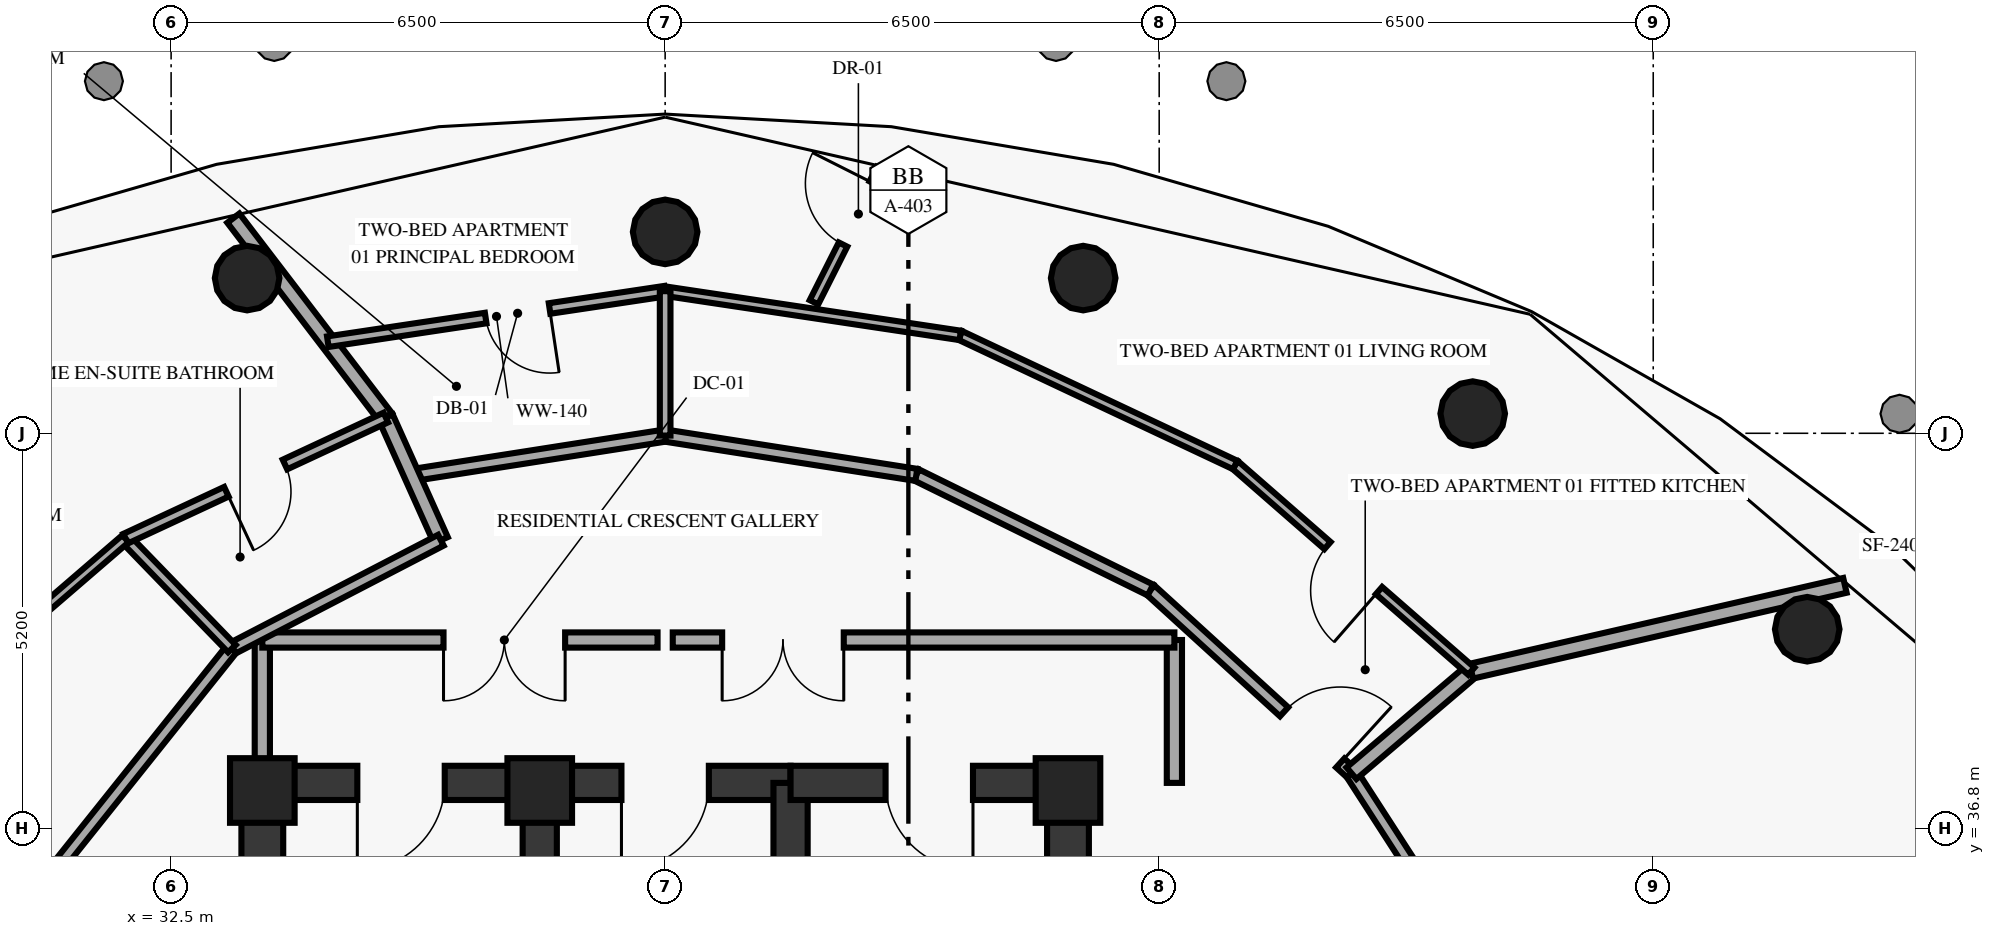
"""IFC4 building model, lengths in metres.
Left out: names, types, materials, properties, quantities, classifications, styles, units other than length and angle.
Written with IfcOpenShell. Run it as: python <this file> out.ifc"""

import sys

from ifc_helpers import new_model, si_unit, direction, frame, frame_2d, origin, origin_2d, place, context, subcontext, project, spatial, rectangle, circle, extrude, element, fill, save


model = new_model("IFC4")
c1 = context("Model", 3, precision=1e-05, world=origin(), true_north=direction((0.0, 1.0)))
c2 = subcontext(c1, "Body", "Model", "MODEL_VIEW")
j1 = project(units=[si_unit("LENGTHUNIT", "METRE"), si_unit("PLANEANGLEUNIT", "RADIAN")], contexts=[c1])
p1 = place(None, origin())
s1 = spatial("IfcSite", under=j1, at=p1, CompositionType="ELEMENT")
p2 = place(p1, origin())
s2 = spatial("IfcBuilding", under=s1, at=p2, CompositionType="ELEMENT")
p3 = place(p2, frame((0.0, 0.0, 208.15)))
s3 = spatial("IfcBuildingStorey", under=s2, at=p3, CompositionType="ELEMENT", Elevation=208.15)
for number, where, z_axis, x_axis in (
    (1, (44.3, 37.3, 0.0), (0.0, 0.0, 1.0), (1.0, 0.0, 0.0)),
    (2, (37.35, 37.3, 0.0), (0.0, 0.0, 1.0), (1.0, 0.0, 0.0)),
    (3, (33.7, 37.3, 0.0), (0.0, 0.0, 1.0), (1.0, 0.0, 0.0)),
):
    element("IfcColumn", number, at=place(p3, frame(where, z_axis=z_axis, x_axis=x_axis)), inside=s3, PredefinedType="PILASTER", context=c2, shape_type="SweptSolid", body=[
        extrude(rectangle(XDim=0.85, YDim=0.85, at=origin_2d()), origin(), (0.0, 0.0, 1.0), 3.41),
    ])
for number, where, z_axis, x_axis in (
    (4, (54.026, 39.422, 0.0), (0.0, 0.0, 1.0), (1.0, 0.0, 0.0)),
    (5, (49.625, 42.259, 0.0), (0.0, 0.0, 1.0), (1.0, 0.0, 0.0)),
    (6, (44.5, 44.042, 0.0), (0.0, 0.0, 1.0), (1.0, 0.0, 0.0)),
    (7, (39.0, 44.65, 0.0), (0.0, 0.0, 1.0), (1.0, 0.0, 0.0)),
    (8, (33.5, 44.042, 0.0), (0.0, 0.0, 1.0), (1.0, 0.0, 0.0)),
):
    element("IfcColumn", number, at=place(p3, frame(where, z_axis=z_axis, x_axis=x_axis)), inside=s3, PredefinedType="COLUMN", context=c2, shape_type="SweptSolid", body=[
        extrude(circle(Radius=0.425, at=origin_2d()), origin(), (0.0, 0.0, 1.0), 3.41),
    ])
for number, where, z_axis, x_axis in (
    (9, (33.7, 29.05, 0.0), (0.0, 0.0, 1.0), (0.0, 1.0, 0.0)),
    (10, (44.3, 29.05, 0.0), (0.0, 0.0, 1.0), (0.0, 1.0, 0.0)),
):
    element("IfcWall", number, at=place(p3, frame(where, z_axis=z_axis, x_axis=x_axis)), inside=s3, PredefinedType="SHEAR", context=c2, shape_type="SweptSolid", body=[
        extrude(rectangle(XDim=8.35, YDim=0.55, at=frame_2d((4.175, 0.0))), origin(), (0.0, 0.0, 1.0), 3.41),
    ])
p4 = place(p3, frame((37.35, 37.4, 0.0), z_axis=(0.0, 0.0, 1.0), x_axis=(-1.0, 0.0, 0.0)))
e11 = element("IfcWall", 11, at=p4, inside=s3, PredefinedType="SHEAR", context=c2, shape_type="SweptSolid", body=[
    extrude(rectangle(XDim=3.65, YDim=0.45, at=frame_2d((1.825, 0.0))), origin(), (0.0, 0.0, 1.0), 3.41),
])
p5 = place(p4, frame((1.25, 0.0, 0.0)))
e12 = element("IfcOpeningElement", 12, at=p5, cuts=e11, PredefinedType="OPENING", context=c2, shape_type="SweptSolid", body=[
    extrude(rectangle(XDim=1.15, YDim=2.15, at=frame_2d((0.575, 1.075))), frame((0.0, 0.235, 0.0), z_axis=(0.0, -1.0, 0.0), x_axis=(1.0, 0.0, 0.0)), (0.0, 0.0, 1.0), 0.47),
])
p6 = place(p3, frame((37.35, 29.05, 0.0), z_axis=(0.0, 0.0, 1.0), x_axis=(0.0, 1.0, 0.0)))
e13 = element("IfcWall", 13, at=p6, inside=s3, PredefinedType="SHEAR", context=c2, shape_type="SweptSolid", body=[
    extrude(rectangle(XDim=8.35, YDim=0.45, at=frame_2d((4.175, 0.0))), origin(), (0.0, 0.0, 1.0), 3.41),
])
p7 = place(p3, frame((40.65, 37.4, 0.0), z_axis=(0.0, 0.0, 1.0), x_axis=(-1.0, 0.0, 0.0)))
e14 = element("IfcWall", 14, at=p7, inside=s3, PredefinedType="SHEAR", context=c2, shape_type="SweptSolid", body=[
    extrude(rectangle(XDim=3.3, YDim=0.45, at=frame_2d((1.65, 0.0))), origin(), (0.0, 0.0, 1.0), 3.41),
])
p8 = place(p7, frame((1.075, 0.0, 0.0)))
e15 = element("IfcOpeningElement", 15, at=p8, cuts=e14, PredefinedType="OPENING", context=c2, shape_type="SweptSolid", body=[
    extrude(rectangle(XDim=1.15, YDim=2.15, at=frame_2d((0.575, 1.075))), frame((0.0, 0.235, 0.0), z_axis=(0.0, -1.0, 0.0), x_axis=(1.0, 0.0, 0.0)), (0.0, 0.0, 1.0), 0.47),
])
p9 = place(p3, frame((40.65, 29.05, 0.0), z_axis=(0.0, 0.0, 1.0), x_axis=(0.0, 1.0, 0.0)))
e16 = element("IfcWall", 16, at=p9, inside=s3, PredefinedType="SHEAR", context=c2, shape_type="SweptSolid", body=[
    extrude(rectangle(XDim=8.35, YDim=0.45, at=frame_2d((4.175, 0.0))), origin(), (0.0, 0.0, 1.0), 3.41),
])
p10 = place(p3, frame((44.3, 37.4, 0.0), z_axis=(0.0, 0.0, 1.0), x_axis=(-1.0, 0.0, 0.0)))
e17 = element("IfcWall", 17, at=p10, inside=s3, PredefinedType="SHEAR", context=c2, shape_type="SweptSolid", body=[
    extrude(rectangle(XDim=3.65, YDim=0.45, at=frame_2d((1.825, 0.0))), origin(), (0.0, 0.0, 1.0), 3.41),
])
p11 = place(p10, frame((1.25, 0.0, 0.0)))
e18 = element("IfcOpeningElement", 18, at=p11, cuts=e17, PredefinedType="OPENING", context=c2, shape_type="SweptSolid", body=[
    extrude(rectangle(XDim=1.15, YDim=2.15, at=frame_2d((0.575, 1.075))), frame((0.0, 0.235, 0.0), z_axis=(0.0, -1.0, 0.0), x_axis=(1.0, 0.0, 0.0)), (0.0, 0.0, 1.0), 0.47),
])
for number, where, z_axis, x_axis in (
    (19, (33.7, 37.4, 0.0), (0.0, 0.0, 1.0), (0.0, 1.0, 0.0)),
    (20, (45.7, 37.4, 0.0), (0.0, 0.0, 1.0), (0.0, 1.0, 0.0)),
):
    element("IfcWall", number, at=place(p3, frame(where, z_axis=z_axis, x_axis=x_axis)), inside=s3, PredefinedType="SOLIDWALL", context=c2, shape_type="SweptSolid", body=[
        extrude(rectangle(XDim=1.88, YDim=0.2, at=frame_2d((0.94, 0.0))), origin(), (0.0, 0.0, 1.0), 3.41),
    ])
p12 = place(p3, frame((38.9, 39.28, 0.0), z_axis=(0.0, 0.0, 1.0), x_axis=(-1.0, 0.0, 0.0)))
e21 = element("IfcWall", 21, at=p12, inside=s3, PredefinedType="SOLIDWALL", context=c2, shape_type="SweptSolid", body=[
    extrude(rectangle(XDim=5.2, YDim=0.2, at=frame_2d((2.6, 0.0))), origin(), (0.0, 0.0, 1.0), 3.41),
])
p13 = place(p12, frame((1.216, 0.0, 0.0)))
e22 = element("IfcOpeningElement", 22, at=p13, cuts=e21, PredefinedType="OPENING", context=c2, shape_type="SweptSolid", body=[
    extrude(rectangle(XDim=1.6, YDim=2.2, at=frame_2d((0.8, 1.1))), frame((0.0, 0.11, 0.0), z_axis=(0.0, -1.0, 0.0), x_axis=(1.0, 0.0, 0.0)), (0.0, 0.0, 1.0), 0.22),
])
p14 = place(p3, frame((45.7, 39.28, 0.0), z_axis=(0.0, 0.0, 1.0), x_axis=(-1.0, 0.0, 0.0)))
e23 = element("IfcWall", 23, at=p14, inside=s3, PredefinedType="SOLIDWALL", context=c2, shape_type="SweptSolid", body=[
    extrude(rectangle(XDim=6.6, YDim=0.2, at=frame_2d((3.3, 0.0))), origin(), (0.0, 0.0, 1.0), 3.41),
])
p15 = place(p14, frame((4.35, 0.0, 0.0)))
e24 = element("IfcOpeningElement", 24, at=p15, cuts=e23, PredefinedType="OPENING", context=c2, shape_type="SweptSolid", body=[
    extrude(rectangle(XDim=1.6, YDim=2.2, at=frame_2d((0.8, 1.1))), frame((0.0, 0.11, 0.0), z_axis=(0.0, -1.0, 0.0), x_axis=(1.0, 0.0, 0.0)), (0.0, 0.0, 1.0), 0.22),
])
p16 = place(p3, frame((50.059, 34.385, 0.0), z_axis=(0.0, 0.0, 1.0), x_axis=(-0.542485127432, 0.840065406094, 0.0)))
e25 = element("IfcWall", 25, at=p16, inside=s3, PredefinedType="PARTITIONING", context=c2, shape_type="SweptSolid", body=[
    extrude(rectangle(XDim=3.74, YDim=0.16, at=frame_2d((1.87, 0.0))), origin(), (0.0, 0.0, 1.0), 3.41),
])
p17 = place(p3, frame((45.385, 39.938, 0.0), z_axis=(0.0, 0.0, 1.0), x_axis=(0.739059723008, -0.673639908132, 0.0)))
e26 = element("IfcWall", 26, at=p17, inside=s3, PredefinedType="PARTITIONING", context=c2, shape_type="SweptSolid", body=[
    extrude(rectangle(XDim=3.579, YDim=0.16, at=frame_2d((1.79, 0.0))), origin(), (0.0, 0.0, 1.0), 3.41),
])
p18 = place(p17, frame((2.379, 0.0, 0.0)))
e27 = element("IfcOpeningElement", 27, at=p18, cuts=e26, PredefinedType="OPENING", context=c2, shape_type="SweptSolid", body=[
    extrude(rectangle(XDim=1.0, YDim=2.15, at=frame_2d((0.5, 1.075))), frame((0.0, 0.09, 0.0), z_axis=(0.0, -1.0, 0.0), x_axis=(1.0, 0.0, 0.0)), (0.0, 0.0, 1.0), 0.18),
])
p19 = place(p3, frame((45.385, 39.938, 0.0), z_axis=(0.0, 0.0, 1.0), x_axis=(-0.897338421719, 0.441343128311, 0.0)))
e28 = element("IfcWall", 28, at=p19, inside=s3, PredefinedType="PARTITIONING", context=c2, shape_type="SweptSolid", body=[
    extrude(rectangle(XDim=3.432, YDim=0.16, at=frame_2d((1.716, 0.0))), origin(), (0.0, 0.0, 1.0), 3.41),
])
p20 = place(p3, frame((42.305, 41.453, 0.0), z_axis=(0.0, 0.0, 1.0), x_axis=(-0.987980356559, 0.154579478111, 0.0)))
e29 = element("IfcWall", 29, at=p20, inside=s3, PredefinedType="PARTITIONING", context=c2, shape_type="SweptSolid", body=[
    extrude(rectangle(XDim=3.345, YDim=0.16, at=frame_2d((1.673, 0.0))), origin(), (0.0, 0.0, 1.0), 3.41),
])
p21 = place(p3, frame((39.0, 41.97, 0.0), z_axis=(0.0, 0.0, 1.0), x_axis=(-0.987972011059, -0.154632808173, 0.0)))
e30 = element("IfcWall", 30, at=p21, inside=s3, PredefinedType="PARTITIONING", context=c2, shape_type="SweptSolid", body=[
    extrude(rectangle(XDim=3.375, YDim=0.16, at=frame_2d((1.688, 0.0))), origin(), (0.0, 0.0, 1.0), 3.41),
])
p22 = place(p3, frame((36.049, 40.593, 0.0), z_axis=(0.0, 0.0, 1.0), x_axis=(-0.409337233456, 0.912383159263, 0.0)))
e31 = element("IfcWall", 31, at=p22, inside=s3, PredefinedType="PARTITIONING", context=c2, shape_type="SweptSolid", body=[
    extrude(rectangle(XDim=1.769, YDim=0.2, at=frame_2d((0.885, 0.0))), origin(), (0.0, 0.0, 1.0), 3.41),
])
p23 = place(p3, frame((35.325, 42.207, 0.0), z_axis=(0.0, 0.0, 1.0), x_axis=(-0.607307427022, 0.794466921328, 0.0)))
e32 = element("IfcWall", 32, at=p23, inside=s3, PredefinedType="PARTITIONING", context=c2, shape_type="SweptSolid", body=[
    extrude(rectangle(XDim=3.303, YDim=0.2, at=frame_2d((1.651, 0.0))), origin(), (0.0, 0.0, 1.0), 3.41),
])
p24 = place(p3, frame((48.03, 37.527, 0.0), z_axis=(0.0, 0.0, 1.0), x_axis=(0.761307875953, 0.64839055978, 0.0)))
e33 = element("IfcWall", 33, at=p24, inside=s3, PredefinedType="PARTITIONING", context=c2, shape_type="SweptSolid", body=[
    extrude(rectangle(XDim=2.071, YDim=0.2, at=frame_2d((1.036, 0.0))), origin(), (0.0, 0.0, 1.0), 3.41),
])
p25 = place(p3, frame((49.607, 38.87, 0.0), z_axis=(0.0, 0.0, 1.0), x_axis=(0.974622401259, 0.223855254492, 0.0)))
e34 = element("IfcWall", 34, at=p25, inside=s3, PredefinedType="PARTITIONING", context=c2, shape_type="SweptSolid", body=[
    extrude(rectangle(XDim=5.043, YDim=0.2, at=frame_2d((2.521, 0.0))), origin(), (0.0, 0.0, 1.0), 3.41),
])
p26 = place(p3, frame((46.5, 41.583, 0.0), z_axis=(0.0, 0.0, 1.0), x_axis=(0.753258291351, -0.657724825828, 0.0)))
e35 = element("IfcWall", 35, at=p26, inside=s3, PredefinedType="PARTITIONING", context=c2, shape_type="SweptSolid", body=[
    extrude(rectangle(XDim=4.125, YDim=0.125, at=frame_2d((2.062, 0.0))), origin(), (0.0, 0.0, 1.0), 3.41),
])
p27 = place(p26, frame((1.612, 0.0, 0.0)))
e36 = element("IfcOpeningElement", 36, at=p27, cuts=e35, PredefinedType="OPENING", context=c2, shape_type="SweptSolid", body=[
    extrude(rectangle(XDim=0.9, YDim=2.1, at=frame_2d((0.45, 1.05))), frame((0.0, 0.073, 0.0), z_axis=(0.0, -1.0, 0.0), x_axis=(1.0, 0.0, 0.0)), (0.0, 0.0, 1.0), 0.145),
])
p28 = place(p3, frame((46.5, 41.583, 0.0), z_axis=(0.0, 0.0, 1.0), x_axis=(-0.904575079673, 0.426314350256, 0.0)))
e37 = element("IfcWall", 37, at=p28, inside=s3, PredefinedType="PARTITIONING", context=c2, shape_type="SweptSolid", body=[
    extrude(rectangle(XDim=4.0, YDim=0.125, at=frame_2d((2.0, 0.0))), origin(), (0.0, 0.0, 1.0), 3.41),
])
p29 = place(p3, frame((42.882, 43.288, 0.0), z_axis=(0.0, 0.0, 1.0), x_axis=(-0.988946842781, 0.148270503314, 0.0)))
e38 = element("IfcWall", 38, at=p29, inside=s3, PredefinedType="PARTITIONING", context=c2, shape_type="SweptSolid", body=[
    extrude(rectangle(XDim=3.926, YDim=0.125, at=frame_2d((1.963, 0.0))), origin(), (0.0, 0.0, 1.0), 3.41),
])
p30 = place(p3, frame((34.562, 43.205, 0.0), z_axis=(0.0, 0.0, 1.0), x_axis=(0.98895789125, 0.148196792593, 0.0)))
e39 = element("IfcWall", 39, at=p30, inside=s3, PredefinedType="PARTITIONING", context=c2, shape_type="SweptSolid", body=[
    extrude(rectangle(XDim=4.488, YDim=0.14, at=frame_2d((2.244, 0.0))), origin(), (0.0, 0.0, 1.0), 3.41),
])
p31 = place(p30, frame((2.1, 0.0, 0.0)))
e40 = element("IfcOpeningElement", 40, at=p31, cuts=e39, PredefinedType="OPENING", context=c2, shape_type="SweptSolid", body=[
    extrude(rectangle(XDim=0.85, YDim=2.1, at=frame_2d((0.425, 1.05))), frame((0.0, 0.08, 0.0), z_axis=(0.0, -1.0, 0.0), x_axis=(1.0, 0.0, 0.0)), (0.0, 0.0, 1.0), 0.16),
])
p32 = place(p3, frame((39.0, 41.97, 0.0), z_axis=(0.0, 0.0, 1.0), x_axis=(0.0, 1.0, 0.0)))
e41 = element("IfcWall", 41, at=p32, inside=s3, PredefinedType="PARTITIONING", context=c2, shape_type="SweptSolid", body=[
    extrude(rectangle(XDim=1.9, YDim=0.14, at=frame_2d((0.95, 0.0))), origin(), (0.0, 0.0, 1.0), 3.41),
])
p33 = place(p3, frame((40.958, 43.724, 0.0), z_axis=(0.0, 0.0, 1.0), x_axis=(0.449698449796, 0.893180443276, 0.0)))
e42 = element("IfcWall", 42, at=p33, inside=s3, PredefinedType="PARTITIONING", context=c2, shape_type="SweptSolid", body=[
    extrude(rectangle(XDim=1.964, YDim=0.125, at=frame_2d((0.982, 0.0))), origin(), (0.0, 0.0, 1.0), 3.41),
])
p34 = place(p33, frame((0.85, 0.0, 0.0)))
e43 = element("IfcOpeningElement", 43, at=p34, cuts=e42, PredefinedType="OPENING", context=c2, shape_type="SweptSolid", body=[
    extrude(rectangle(XDim=0.9, YDim=2.1, at=frame_2d((0.45, 1.05))), frame((0.0, 0.073, 0.0), z_axis=(0.0, -1.0, 0.0), x_axis=(1.0, 0.0, 0.0)), (0.0, 0.0, 1.0), 0.145),
])
p35 = place(p3, frame((36.049, 40.593, 0.0), z_axis=(0.0, 0.0, 1.0), x_axis=(-0.887674575788, -0.460471331898, 0.0)))
e44 = element("IfcWall", 44, at=p35, inside=s3, PredefinedType="PARTITIONING", context=c2, shape_type="SweptSolid", body=[
    extrude(rectangle(XDim=3.097, YDim=0.16, at=frame_2d((1.548, 0.0))), origin(), (0.0, 0.0, 1.0), 3.41),
])
p36 = place(p3, frame((33.3, 39.167, 0.0), z_axis=(0.0, 0.0, 1.0), x_axis=(-0.623915746766, -0.781491612839, 0.0)))
e45 = element("IfcWall", 45, at=p36, inside=s3, PredefinedType="PARTITIONING", context=c2, shape_type="SweptSolid", body=[
    extrude(rectangle(XDim=6.688, YDim=0.16, at=frame_2d((3.344, 0.0))), origin(), (0.0, 0.0, 1.0), 3.41),
])
p37 = place(p3, frame((33.3, 39.167, 0.0), z_axis=(0.0, 0.0, 1.0), x_axis=(-0.695613346208, 0.718416364358, 0.0)))
e46 = element("IfcWall", 46, at=p37, inside=s3, PredefinedType="PARTITIONING", context=c2, shape_type="SweptSolid", body=[
    extrude(rectangle(XDim=2.013, YDim=0.14, at=frame_2d((1.006, 0.0))), origin(), (0.0, 0.0, 1.0), 3.41),
])
p38 = place(p3, frame((31.9, 40.613, 0.0), z_axis=(0.0, 0.0, 1.0), x_axis=(0.906625113427, 0.421937085007, 0.0)))
e47 = element("IfcWall", 47, at=p38, inside=s3, PredefinedType="PARTITIONING", context=c2, shape_type="SweptSolid", body=[
    extrude(rectangle(XDim=3.778, YDim=0.14, at=frame_2d((1.889, 0.0))), origin(), (0.0, 0.0, 1.0), 3.41),
])
p39 = place(p38, frame((1.464, 0.0, 0.0)))
e48 = element("IfcOpeningElement", 48, at=p39, cuts=e47, PredefinedType="OPENING", context=c2, shape_type="SweptSolid", body=[
    extrude(rectangle(XDim=0.85, YDim=2.1, at=frame_2d((0.425, 1.05))), frame((0.0, 0.08, 0.0), z_axis=(0.0, -1.0, 0.0), x_axis=(1.0, 0.0, 0.0)), (0.0, 0.0, 1.0), 0.16),
])
p40 = place(p3, frame((28.959, 38.078, 0.0), z_axis=(0.0, 0.0, 1.0), x_axis=(0.757424973134, 0.652922208286, 0.0)))
e49 = element("IfcWall", 49, at=p40, inside=s3, PredefinedType="PARTITIONING", context=c2, shape_type="SweptSolid", body=[
    extrude(rectangle(XDim=3.883, YDim=0.125, at=frame_2d((1.941, 0.0))), origin(), (0.0, 0.0, 1.0), 3.41),
])
p41 = place(p40, frame((1.491, 0.0, 0.0)))
e50 = element("IfcOpeningElement", 50, at=p41, cuts=e49, PredefinedType="OPENING", context=c2, shape_type="SweptSolid", body=[
    extrude(rectangle(XDim=0.9, YDim=2.1, at=frame_2d((0.45, 1.05))), frame((0.0, 0.073, 0.0), z_axis=(0.0, -1.0, 0.0), x_axis=(1.0, 0.0, 0.0)), (0.0, 0.0, 1.0), 0.145),
])
p42 = place(p5, origin())
e51 = element("IfcDoor", 51, at=p42, inside=s3, OperationType="SINGLE_SWING_RIGHT", PredefinedType="DOOR", context=c2, shape_type="SweptSolid", body=[
    extrude(rectangle(XDim=1.15, YDim=2.15, at=frame_2d((0.575, 1.075))), frame((0.0, 0.025, 0.0), z_axis=(0.0, -1.0, 0.0), x_axis=(1.0, 0.0, 0.0)), (0.0, 0.0, 1.0), 0.05),
])
fill(e12, e51)
p43 = place(p8, origin())
e52 = element("IfcDoor", 52, at=p43, inside=s3, OperationType="SINGLE_SWING_RIGHT", PredefinedType="DOOR", context=c2, shape_type="SweptSolid", body=[
    extrude(rectangle(XDim=1.15, YDim=2.15, at=frame_2d((0.575, 1.075))), frame((0.0, 0.025, 0.0), z_axis=(0.0, -1.0, 0.0), x_axis=(1.0, 0.0, 0.0)), (0.0, 0.0, 1.0), 0.05),
])
fill(e15, e52)
p44 = place(p11, origin())
e53 = element("IfcDoor", 53, at=p44, inside=s3, OperationType="SINGLE_SWING_LEFT", PredefinedType="DOOR", context=c2, shape_type="SweptSolid", body=[
    extrude(rectangle(XDim=1.15, YDim=2.15, at=frame_2d((0.575, 1.075))), frame((0.0, 0.025, 0.0), z_axis=(0.0, -1.0, 0.0), x_axis=(1.0, 0.0, 0.0)), (0.0, 0.0, 1.0), 0.05),
])
fill(e18, e53)
p45 = place(p13, origin())
e54 = element("IfcDoor", 54, at=p45, inside=s3, OperationType="DOUBLE_DOOR_SINGLE_SWING", PredefinedType="DOOR", context=c2, shape_type="SweptSolid", body=[
    extrude(rectangle(XDim=1.6, YDim=2.2, at=frame_2d((0.8, 1.1))), frame((0.0, 0.025, 0.0), z_axis=(0.0, -1.0, 0.0), x_axis=(1.0, 0.0, 0.0)), (0.0, 0.0, 1.0), 0.05),
])
fill(e22, e54)
p46 = place(p15, origin())
e55 = element("IfcDoor", 55, at=p46, inside=s3, OperationType="DOUBLE_DOOR_SINGLE_SWING", PredefinedType="DOOR", context=c2, shape_type="SweptSolid", body=[
    extrude(rectangle(XDim=1.6, YDim=2.2, at=frame_2d((0.8, 1.1))), frame((0.0, 0.025, 0.0), z_axis=(0.0, -1.0, 0.0), x_axis=(1.0, 0.0, 0.0)), (0.0, 0.0, 1.0), 0.05),
])
fill(e24, e55)
p47 = place(p18, origin())
e56 = element("IfcDoor", 56, at=p47, inside=s3, OperationType="SINGLE_SWING_RIGHT", PredefinedType="DOOR", context=c2, shape_type="SweptSolid", body=[
    extrude(rectangle(XDim=1.0, YDim=2.15, at=frame_2d((0.5, 1.075))), frame((0.0, 0.025, 0.0), z_axis=(0.0, -1.0, 0.0), x_axis=(1.0, 0.0, 0.0)), (0.0, 0.0, 1.0), 0.05),
])
fill(e27, e56)
p48 = place(p27, origin())
e57 = element("IfcDoor", 57, at=p48, inside=s3, OperationType="SINGLE_SWING_RIGHT", PredefinedType="DOOR", context=c2, shape_type="SweptSolid", body=[
    extrude(rectangle(XDim=0.9, YDim=2.1, at=frame_2d((0.45, 1.05))), frame((0.0, 0.025, 0.0), z_axis=(0.0, -1.0, 0.0), x_axis=(1.0, 0.0, 0.0)), (0.0, 0.0, 1.0), 0.05),
])
fill(e36, e57)
p49 = place(p31, origin())
e58 = element("IfcDoor", 58, at=p49, inside=s3, OperationType="SINGLE_SWING_RIGHT", PredefinedType="DOOR", context=c2, shape_type="SweptSolid", body=[
    extrude(rectangle(XDim=0.85, YDim=2.1, at=frame_2d((0.425, 1.05))), frame((0.0, 0.025, 0.0), z_axis=(0.0, -1.0, 0.0), x_axis=(1.0, 0.0, 0.0)), (0.0, 0.0, 1.0), 0.05),
])
fill(e40, e58)
p50 = place(p34, origin())
e59 = element("IfcDoor", 59, at=p50, inside=s3, OperationType="SINGLE_SWING_RIGHT", PredefinedType="DOOR", context=c2, shape_type="SweptSolid", body=[
    extrude(rectangle(XDim=0.9, YDim=2.1, at=frame_2d((0.45, 1.05))), frame((0.0, 0.025, 0.0), z_axis=(0.0, -1.0, 0.0), x_axis=(1.0, 0.0, 0.0)), (0.0, 0.0, 1.0), 0.05),
])
fill(e43, e59)
p51 = place(p39, origin())
e60 = element("IfcDoor", 60, at=p51, inside=s3, OperationType="SINGLE_SWING_LEFT", PredefinedType="DOOR", context=c2, shape_type="SweptSolid", body=[
    extrude(rectangle(XDim=0.85, YDim=2.1, at=frame_2d((0.425, 1.05))), frame((0.0, 0.025, 0.0), z_axis=(0.0, -1.0, 0.0), x_axis=(1.0, 0.0, 0.0)), (0.0, 0.0, 1.0), 0.05),
])
fill(e48, e60)
save(model, sys.argv[1])
